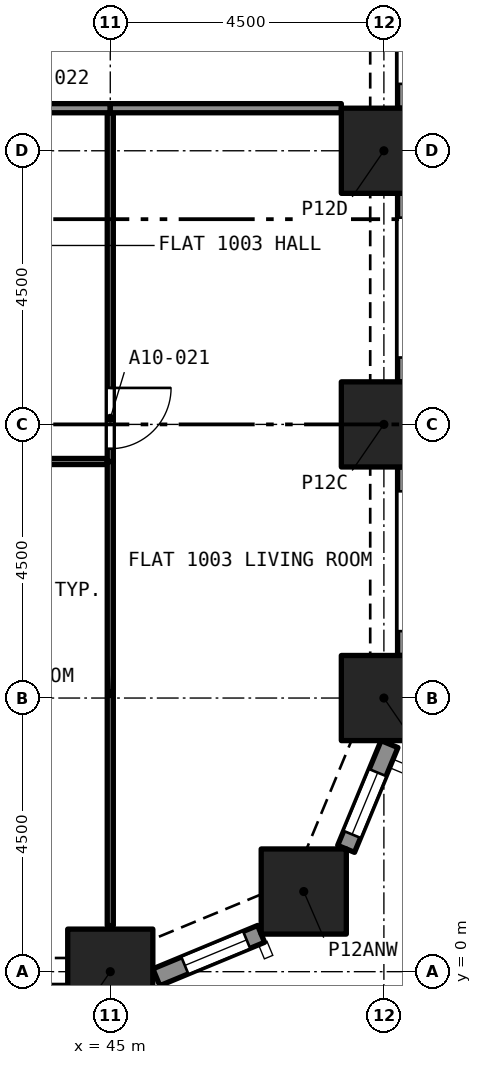
"""IFC4 building model, lengths in metres.
Left out: names, types, materials, properties, quantities, classifications, styles, units other than length and angle.
Written with IfcOpenShell. Run it as: python <this file> out.ifc"""

import sys

from ifc_helpers import new_model, si_unit, direction, frame, frame_2d, origin, origin_2d, place, context, subcontext, project, spatial, rectangle, extrude, element, fill, save


model = new_model("IFC4")
c1 = context("Model", 3, precision=1e-05, world=origin(), true_north=direction((0.0, 1.0)))
c2 = subcontext(c1, "Body", "Model", "MODEL_VIEW")
j1 = project(units=[si_unit("LENGTHUNIT", "METRE"), si_unit("PLANEANGLEUNIT", "RADIAN")], contexts=[c1])
p1 = place(None, origin())
s1 = spatial("IfcSite", under=j1, at=p1, CompositionType="ELEMENT")
p2 = place(p1, origin())
s2 = spatial("IfcBuilding", under=s1, at=p2, CompositionType="ELEMENT")
p3 = place(p2, frame((0.0, 0.0, 43.2)))
s3 = spatial("IfcBuildingStorey", under=s2, at=p3, CompositionType="ELEMENT", Elevation=43.2)
for number, where, z_axis, x_axis in (
    (1, (45.0, 0.0, 0.0), (0.0, 0.0, 1.0), (1.0, 0.0, 0.0)),
    (2, (48.182, 1.318, 0.0), (0.0, 0.0, 1.0), (1.0, 0.0, 0.0)),
    (3, (49.5, 4.5, 0.0), (0.0, 0.0, 1.0), (1.0, 0.0, 0.0)),
    (4, (49.5, 9.0, 0.0), (0.0, 0.0, 1.0), (1.0, 0.0, 0.0)),
    (5, (49.5, 13.5, 0.0), (0.0, 0.0, 1.0), (1.0, 0.0, 0.0)),
):
    element("IfcColumn", number, at=place(p3, frame(where, z_axis=z_axis, x_axis=x_axis)), inside=s3, PredefinedType="COLUMN", context=c2, shape_type="SweptSolid", body=[
        extrude(rectangle(XDim=1.4, YDim=1.4, at=origin_2d()), origin(), (0.0, 0.0, 1.0), 3.2),
    ])
p4 = place(p3, frame((47.48, 0.622, 0.0), z_axis=(0.0, 0.0, 1.0), x_axis=(-0.923903565336, -0.38262540684, 0.0)))
e6 = element("IfcWall", 6, at=p4, inside=s3, PredefinedType="SOLIDWALL", context=c2, shape_type="SweptSolid", body=[
    extrude(rectangle(XDim=1.865, YDim=0.3, at=frame_2d((0.933, 0.0))), origin(), (0.0, 0.0, 1.0), 3.2),
])
p5 = place(p4, frame((0.258, 0.0, 0.45)))
e7 = element("IfcOpeningElement", 7, at=p5, cuts=e6, PredefinedType="OPENING", context=c2, shape_type="SweptSolid", body=[
    extrude(rectangle(XDim=1.1, YDim=1.95, at=frame_2d((0.55, 0.975))), frame((0.0, 0.16, 0.0), z_axis=(0.0, -1.0, 0.0), x_axis=(1.0, 0.0, 0.0)), (0.0, 0.0, 1.0), 0.32),
])
p6 = place(p3, frame((49.592, 3.743, 0.0), z_axis=(0.0, 0.0, 1.0), x_axis=(-0.382737135771, -0.923857286003, 0.0)))
e8 = element("IfcWall", 8, at=p6, inside=s3, PredefinedType="SOLIDWALL", context=c2, shape_type="SweptSolid", body=[
    extrude(rectangle(XDim=1.865, YDim=0.3, at=frame_2d((0.933, 0.0))), origin(), (0.0, 0.0, 1.0), 3.2),
])
p7 = place(p6, frame((0.508, 0.0, 0.45)))
e9 = element("IfcOpeningElement", 9, at=p7, cuts=e8, PredefinedType="OPENING", context=c2, shape_type="SweptSolid", body=[
    extrude(rectangle(XDim=1.1, YDim=1.95, at=frame_2d((0.55, 0.975))), frame((0.0, 0.16, 0.0), z_axis=(0.0, -1.0, 0.0), x_axis=(1.0, 0.0, 0.0)), (0.0, 0.0, 1.0), 0.32),
])
p8 = place(p3, frame((49.875, 8.3, 0.0), z_axis=(0.0, 0.0, 1.0), x_axis=(0.0, -1.0, 0.0)))
e10 = element("IfcWall", 10, at=p8, inside=s3, PredefinedType="SOLIDWALL", context=c2, shape_type="SweptSolid", body=[
    extrude(rectangle(XDim=3.1, YDim=0.3, at=frame_2d((1.55, 0.0))), origin(), (0.0, 0.0, 1.0), 3.2),
])
p9 = place(p8, frame((0.4, 0.0, 0.45)))
e11 = element("IfcOpeningElement", 11, at=p9, cuts=e10, PredefinedType="OPENING", context=c2, shape_type="SweptSolid", body=[
    extrude(rectangle(XDim=2.3, YDim=1.95, at=frame_2d((1.15, 0.975))), frame((0.0, 0.16, 0.0), z_axis=(0.0, -1.0, 0.0), x_axis=(1.0, 0.0, 0.0)), (0.0, 0.0, 1.0), 0.32),
])
p10 = place(p3, frame((49.875, 12.8, 0.0), z_axis=(0.0, 0.0, 1.0), x_axis=(0.0, -1.0, 0.0)))
e12 = element("IfcWall", 12, at=p10, inside=s3, PredefinedType="SOLIDWALL", context=c2, shape_type="SweptSolid", body=[
    extrude(rectangle(XDim=3.1, YDim=0.3, at=frame_2d((1.55, 0.0))), origin(), (0.0, 0.0, 1.0), 3.2),
])
p11 = place(p10, frame((0.4, 0.0, 0.45)))
e13 = element("IfcOpeningElement", 13, at=p11, cuts=e12, PredefinedType="OPENING", context=c2, shape_type="SweptSolid", body=[
    extrude(rectangle(XDim=2.3, YDim=1.95, at=frame_2d((1.15, 0.975))), frame((0.0, 0.16, 0.0), z_axis=(0.0, -1.0, 0.0), x_axis=(1.0, 0.0, 0.0)), (0.0, 0.0, 1.0), 0.32),
])
p12 = place(p3, frame((49.875, 17.3, 0.0), z_axis=(0.0, 0.0, 1.0), x_axis=(0.0, -1.0, 0.0)))
e14 = element("IfcWall", 14, at=p12, inside=s3, PredefinedType="SOLIDWALL", context=c2, shape_type="SweptSolid", body=[
    extrude(rectangle(XDim=3.1, YDim=0.3, at=frame_2d((1.55, 0.0))), origin(), (0.0, 0.0, 1.0), 3.2),
])
p13 = place(p12, frame((0.4, 0.0, 0.45)))
e15 = element("IfcOpeningElement", 15, at=p13, cuts=e14, PredefinedType="OPENING", context=c2, shape_type="SweptSolid", body=[
    extrude(rectangle(XDim=2.3, YDim=1.95, at=frame_2d((1.15, 0.975))), frame((0.0, 0.16, 0.0), z_axis=(0.0, -1.0, 0.0), x_axis=(1.0, 0.0, 0.0)), (0.0, 0.0, 1.0), 0.32),
])
p14 = place(p3, frame((44.95, 8.39, 0.0), z_axis=(0.0, 0.0, 1.0), x_axis=(-1.0, 0.0, 0.0)))
e16 = element("IfcWall", 16, at=p14, inside=s3, PredefinedType="PARTITIONING", context=c2, shape_type="SweptSolid", body=[
    extrude(rectangle(XDim=4.35, YDim=0.1, at=frame_2d((2.175, 0.0))), origin(), (0.0, 0.0, 1.0), 2.9),
])
p15 = place(p14, frame((1.75, 0.0, 0.0)))
e17 = element("IfcOpeningElement", 17, at=p15, cuts=e16, PredefinedType="OPENING", context=c2, shape_type="SweptSolid", body=[
    extrude(rectangle(XDim=0.9, YDim=2.1, at=frame_2d((0.45, 1.05))), frame((0.0, 0.06, 0.0), z_axis=(0.0, -1.0, 0.0), x_axis=(1.0, 0.0, 0.0)), (0.0, 0.0, 1.0), 0.12),
])
p16 = place(p3, frame((45.0, 0.758, 0.0), z_axis=(0.0, 0.0, 1.0), x_axis=(0.0, 1.0, 0.0)))
e18 = element("IfcWall", 18, at=p16, inside=s3, PredefinedType="PARTITIONING", context=c2, shape_type="SweptSolid", body=[
    extrude(rectangle(XDim=7.632, YDim=0.1, at=frame_2d((3.816, 0.0))), origin(), (0.0, 0.0, 1.0), 2.9),
])
p17 = place(p3, frame((45.0, 14.125, 0.0), z_axis=(0.0, 0.0, 1.0), x_axis=(0.0, -1.0, 0.0)))
e19 = element("IfcWall", 19, at=p17, inside=s3, PredefinedType="PARTITIONING", context=c2, shape_type="SweptSolid", body=[
    extrude(rectangle(XDim=5.735, YDim=0.1, at=frame_2d((2.868, 0.0))), origin(), (0.0, 0.0, 1.0), 2.9),
])
p18 = place(p17, frame((4.525, 0.0, 0.0)))
e20 = element("IfcOpeningElement", 20, at=p18, cuts=e19, PredefinedType="OPENING", context=c2, shape_type="SweptSolid", body=[
    extrude(rectangle(XDim=1.0, YDim=2.1, at=frame_2d((0.5, 1.05))), frame((0.0, 0.06, 0.0), z_axis=(0.0, -1.0, 0.0), x_axis=(1.0, 0.0, 0.0)), (0.0, 0.0, 1.0), 0.12),
])
p19 = place(p3, frame((45.0, 14.2, 0.0), z_axis=(0.0, 0.0, 1.0), x_axis=(-1.0, 0.0, 0.0)))
e21 = element("IfcWall", 21, at=p19, inside=s3, PredefinedType="PARTITIONING", context=c2, shape_type="SweptSolid", body=[
    extrude(rectangle(XDim=2.25, YDim=0.15, at=frame_2d((1.125, 0.0))), origin(), (0.0, 0.0, 1.0), 2.9),
])
p20 = place(p19, frame((1.0, 0.0, 0.0)))
e22 = element("IfcOpeningElement", 22, at=p20, cuts=e21, PredefinedType="OPENING", context=c2, shape_type="SweptSolid", body=[
    extrude(rectangle(XDim=1.0, YDim=2.1, at=frame_2d((0.5, 1.05))), frame((0.0, 0.085, 0.0), z_axis=(0.0, -1.0, 0.0), x_axis=(1.0, 0.0, 0.0)), (0.0, 0.0, 1.0), 0.17),
])
p21 = place(p3, frame((45.0, 14.2, 0.0), z_axis=(0.0, 0.0, 1.0), x_axis=(1.0, 0.0, 0.0)))
e23 = element("IfcWall", 23, at=p21, inside=s3, PredefinedType="PARTITIONING", context=c2, shape_type="SweptSolid", body=[
    extrude(rectangle(XDim=3.8, YDim=0.15, at=frame_2d((1.9, 0.0))), origin(), (0.0, 0.0, 1.0), 2.9),
])
p22 = place(p5, origin())
e24 = element("IfcWindow", 24, at=p22, inside=s3, PartitioningType="SINGLE_PANEL", PredefinedType="WINDOW", context=c2, shape_type="SweptSolid", body=[
    extrude(rectangle(XDim=1.1, YDim=1.95, at=frame_2d((0.55, 0.975))), frame((0.0, 0.03, 0.0), z_axis=(0.0, -1.0, 0.0), x_axis=(1.0, 0.0, 0.0)), (0.0, 0.0, 1.0), 0.06),
])
fill(e7, e24)
p23 = place(p7, origin())
e25 = element("IfcWindow", 25, at=p23, inside=s3, PartitioningType="SINGLE_PANEL", PredefinedType="WINDOW", context=c2, shape_type="SweptSolid", body=[
    extrude(rectangle(XDim=1.1, YDim=1.95, at=frame_2d((0.55, 0.975))), frame((0.0, 0.03, 0.0), z_axis=(0.0, -1.0, 0.0), x_axis=(1.0, 0.0, 0.0)), (0.0, 0.0, 1.0), 0.06),
])
fill(e9, e25)
p24 = place(p18, origin())
e26 = element("IfcDoor", 26, at=p24, inside=s3, OperationType="SINGLE_SWING_RIGHT", PredefinedType="DOOR", context=c2, shape_type="SweptSolid", body=[
    extrude(rectangle(XDim=1.0, YDim=2.1, at=frame_2d((0.5, 1.05))), frame((0.0, 0.025, 0.0), z_axis=(0.0, -1.0, 0.0), x_axis=(1.0, 0.0, 0.0)), (0.0, 0.0, 1.0), 0.05),
])
fill(e20, e26)
save(model, sys.argv[1])
